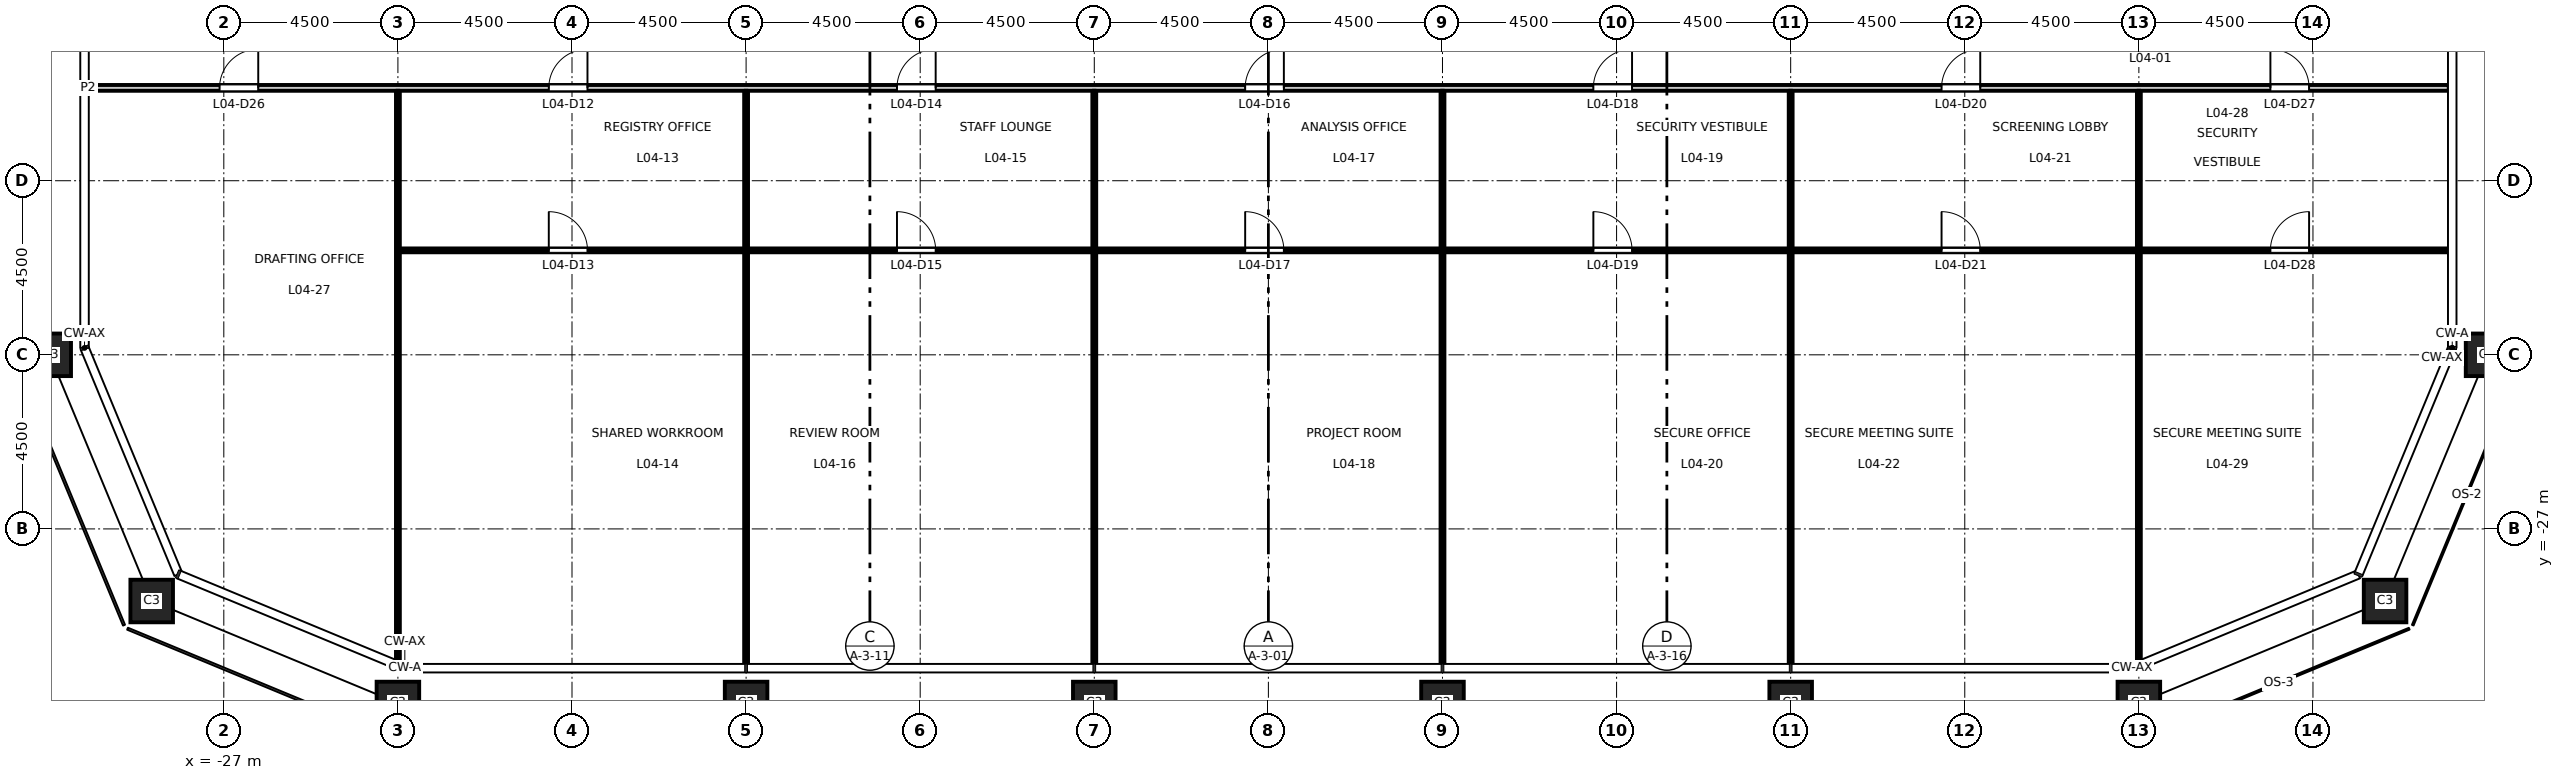
"""IFC4 building model, lengths in metres.
Left out: names, types, materials, properties, quantities, classifications, styles, units other than length and angle.
Written with IfcOpenShell. Run it as: python <this file> out.ifc"""

import sys

from ifc_helpers import new_model, si_unit, direction, frame, frame_2d, origin, origin_2d, place, context, subcontext, project, spatial, rectangle, hollow_rectangle, extrude, element, fill, save


model = new_model("IFC4")
c1 = context("Model", 3, precision=1e-05, world=origin(), true_north=direction((0.0, 1.0)))
c2 = subcontext(c1, "Body", "Model", "MODEL_VIEW")
j1 = project(units=[si_unit("LENGTHUNIT", "METRE"), si_unit("PLANEANGLEUNIT", "RADIAN")], contexts=[c1])
p1 = place(None, origin())
s1 = spatial("IfcSite", under=j1, at=p1, CompositionType="ELEMENT")
p2 = place(p1, origin())
s2 = spatial("IfcBuilding", under=s1, at=p2, CompositionType="ELEMENT")
p3 = place(p2, frame((0.0, 0.0, 22.2)))
s3 = spatial("IfcBuildingStorey", under=s2, at=p3, CompositionType="ELEMENT", Elevation=22.2)
for number, where, z_axis, x_axis in (
    (1, (-22.5, -31.5, 0.0), (0.0, 0.0, 1.0), (1.0, 0.0, 0.0)),
    (2, (-13.5, -31.5, 0.0), (0.0, 0.0, 1.0), (1.0, 0.0, 0.0)),
    (3, (-4.5, -31.5, 0.0), (0.0, 0.0, 1.0), (1.0, 0.0, 0.0)),
    (4, (4.5, -31.5, 0.0), (0.0, 0.0, 1.0), (1.0, 0.0, 0.0)),
    (5, (13.5, -31.5, 0.0), (0.0, 0.0, 1.0), (1.0, 0.0, 0.0)),
    (6, (22.5, -31.5, 0.0), (0.0, 0.0, 1.0), (1.0, 0.0, 0.0)),
    (7, (28.864, -28.864, 0.0), (0.0, 0.0, 1.0), (1.0, 0.0, 0.0)),
    (8, (31.5, -22.5, 0.0), (0.0, 0.0, 1.0), (1.0, 0.0, 0.0)),
    (9, (-31.5, -22.5, 0.0), (0.0, 0.0, 1.0), (1.0, 0.0, 0.0)),
    (10, (-28.864, -28.864, 0.0), (0.0, 0.0, 1.0), (1.0, 0.0, 0.0)),
):
    element("IfcColumn", number, at=place(p3, frame(where, z_axis=z_axis, x_axis=x_axis)), inside=s3, PredefinedType="COLUMN", context=c2, shape_type="SweptSolid", body=[
        extrude(hollow_rectangle(XDim=1.1, YDim=1.1, WallThickness=0.07, at=origin_2d()), origin(), (0.0, 0.0, 1.0), 4.5),
    ])
p4 = place(p3, frame((-22.45, -19.8, 0.0), z_axis=(0.0, 0.0, 1.0), x_axis=(1.0, 0.0, 0.0)))
e11 = element("IfcWall", 11, at=p4, inside=s3, PredefinedType="PARTITIONING", context=c2, shape_type="SweptSolid", body=[
    extrude(rectangle(XDim=52.96, YDim=0.1, at=frame_2d((26.48, 0.0))), origin(), (0.0, 0.0, 1.0), 4.35),
])
p5 = place(p4, frame((3.85, 0.0, 0.0)))
e12 = element("IfcOpeningElement", 12, at=p5, cuts=e11, PredefinedType="OPENING", context=c2, shape_type="SweptSolid", body=[
    extrude(rectangle(XDim=1.0, YDim=2.1, at=frame_2d((0.5, 1.05))), frame((0.0, 0.06, 0.0), z_axis=(0.0, -1.0, 0.0), x_axis=(1.0, 0.0, 0.0)), (0.0, 0.0, 1.0), 0.12),
])
p6 = place(p4, frame((12.85, 0.0, 0.0)))
e13 = element("IfcOpeningElement", 13, at=p6, cuts=e11, PredefinedType="OPENING", context=c2, shape_type="SweptSolid", body=[
    extrude(rectangle(XDim=1.0, YDim=2.1, at=frame_2d((0.5, 1.05))), frame((0.0, 0.06, 0.0), z_axis=(0.0, -1.0, 0.0), x_axis=(1.0, 0.0, 0.0)), (0.0, 0.0, 1.0), 0.12),
])
p7 = place(p4, frame((21.85, 0.0, 0.0)))
e14 = element("IfcOpeningElement", 14, at=p7, cuts=e11, PredefinedType="OPENING", context=c2, shape_type="SweptSolid", body=[
    extrude(rectangle(XDim=1.0, YDim=2.1, at=frame_2d((0.5, 1.05))), frame((0.0, 0.06, 0.0), z_axis=(0.0, -1.0, 0.0), x_axis=(1.0, 0.0, 0.0)), (0.0, 0.0, 1.0), 0.12),
])
p8 = place(p4, frame((30.85, 0.0, 0.0)))
e15 = element("IfcOpeningElement", 15, at=p8, cuts=e11, PredefinedType="OPENING", context=c2, shape_type="SweptSolid", body=[
    extrude(rectangle(XDim=1.0, YDim=2.1, at=frame_2d((0.5, 1.05))), frame((0.0, 0.06, 0.0), z_axis=(0.0, -1.0, 0.0), x_axis=(1.0, 0.0, 0.0)), (0.0, 0.0, 1.0), 0.12),
])
p9 = place(p4, frame((39.85, 0.0, 0.0)))
e16 = element("IfcOpeningElement", 16, at=p9, cuts=e11, PredefinedType="OPENING", context=c2, shape_type="SweptSolid", body=[
    extrude(rectangle(XDim=1.0, YDim=2.1, at=frame_2d((0.5, 1.05))), frame((0.0, 0.06, 0.0), z_axis=(0.0, -1.0, 0.0), x_axis=(1.0, 0.0, 0.0)), (0.0, 0.0, 1.0), 0.12),
])
p10 = place(p4, frame((48.35, 0.0, 0.0)))
e17 = element("IfcOpeningElement", 17, at=p10, cuts=e11, PredefinedType="OPENING", context=c2, shape_type="SweptSolid", body=[
    extrude(rectangle(XDim=1.0, YDim=2.1, at=frame_2d((0.5, 1.05))), frame((0.0, 0.06, 0.0), z_axis=(0.0, -1.0, 0.0), x_axis=(1.0, 0.0, 0.0)), (0.0, 0.0, 1.0), 0.12),
])
p11 = place(p3, frame((-30.51, -15.6, 0.0), z_axis=(0.0, 0.0, 1.0), x_axis=(1.0, 0.0, 0.0)))
e18 = element("IfcWall", 18, at=p11, inside=s3, PredefinedType="PARTITIONING", context=c2, shape_type="SweptSolid", body=[
    extrude(rectangle(XDim=61.02, YDim=0.15, at=frame_2d((30.51, 0.0))), origin(), (0.0, 0.0, 1.0), 4.35),
])
p12 = place(p11, frame((11.91, 0.0, 0.0)))
e19 = element("IfcOpeningElement", 19, at=p12, cuts=e18, PredefinedType="OPENING", context=c2, shape_type="SweptSolid", body=[
    extrude(rectangle(XDim=1.0, YDim=2.1, at=frame_2d((0.5, 1.05))), frame((0.0, 0.085, 0.0), z_axis=(0.0, -1.0, 0.0), x_axis=(1.0, 0.0, 0.0)), (0.0, 0.0, 1.0), 0.17),
])
p13 = place(p11, frame((20.91, 0.0, 0.0)))
e20 = element("IfcOpeningElement", 20, at=p13, cuts=e18, PredefinedType="OPENING", context=c2, shape_type="SweptSolid", body=[
    extrude(rectangle(XDim=1.0, YDim=2.1, at=frame_2d((0.5, 1.05))), frame((0.0, 0.085, 0.0), z_axis=(0.0, -1.0, 0.0), x_axis=(1.0, 0.0, 0.0)), (0.0, 0.0, 1.0), 0.17),
])
p14 = place(p11, frame((29.91, 0.0, 0.0)))
e21 = element("IfcOpeningElement", 21, at=p14, cuts=e18, PredefinedType="OPENING", context=c2, shape_type="SweptSolid", body=[
    extrude(rectangle(XDim=1.0, YDim=2.1, at=frame_2d((0.5, 1.05))), frame((0.0, 0.085, 0.0), z_axis=(0.0, -1.0, 0.0), x_axis=(1.0, 0.0, 0.0)), (0.0, 0.0, 1.0), 0.17),
])
p15 = place(p11, frame((38.91, 0.0, 0.0)))
e22 = element("IfcOpeningElement", 22, at=p15, cuts=e18, PredefinedType="OPENING", context=c2, shape_type="SweptSolid", body=[
    extrude(rectangle(XDim=1.0, YDim=2.1, at=frame_2d((0.5, 1.05))), frame((0.0, 0.085, 0.0), z_axis=(0.0, -1.0, 0.0), x_axis=(1.0, 0.0, 0.0)), (0.0, 0.0, 1.0), 0.17),
])
p16 = place(p11, frame((47.91, 0.0, 0.0)))
e23 = element("IfcOpeningElement", 23, at=p16, cuts=e18, PredefinedType="OPENING", context=c2, shape_type="SweptSolid", body=[
    extrude(rectangle(XDim=1.0, YDim=2.1, at=frame_2d((0.5, 1.05))), frame((0.0, 0.085, 0.0), z_axis=(0.0, -1.0, 0.0), x_axis=(1.0, 0.0, 0.0)), (0.0, 0.0, 1.0), 0.17),
])
p17 = place(p11, frame((3.4, 0.0, 0.0)))
e24 = element("IfcOpeningElement", 24, at=p17, cuts=e18, PredefinedType="OPENING", context=c2, shape_type="SweptSolid", body=[
    extrude(rectangle(XDim=1.0, YDim=2.1, at=frame_2d((0.5, 1.05))), frame((0.0, 0.085, 0.0), z_axis=(0.0, -1.0, 0.0), x_axis=(1.0, 0.0, 0.0)), (0.0, 0.0, 1.0), 0.17),
])
p18 = place(p11, frame((56.41, 0.0, 0.0)))
e25 = element("IfcOpeningElement", 25, at=p18, cuts=e18, PredefinedType="OPENING", context=c2, shape_type="SweptSolid", body=[
    extrude(rectangle(XDim=1.0, YDim=2.1, at=frame_2d((0.5, 1.05))), frame((0.0, 0.085, 0.0), z_axis=(0.0, -1.0, 0.0), x_axis=(1.0, 0.0, 0.0)), (0.0, 0.0, 1.0), 0.17),
])
p19 = place(p3, frame((-22.5, -30.428, 0.0), z_axis=(0.0, 0.0, 1.0), x_axis=(0.0, 1.0, 0.0)))
e26 = element("IfcWall", 26, at=p19, inside=s3, PredefinedType="PARTITIONING", context=c2, shape_type="SweptSolid", body=[
    extrude(rectangle(XDim=14.753, YDim=0.1, at=frame_2d((7.376, 0.0))), origin(), (0.0, 0.0, 1.0), 3.35),
])
p20 = place(p3, frame((-13.5, -30.51, 0.0), z_axis=(0.0, 0.0, 1.0), x_axis=(0.0, 1.0, 0.0)))
e27 = element("IfcWall", 27, at=p20, inside=s3, PredefinedType="PARTITIONING", context=c2, shape_type="SweptSolid", body=[
    extrude(rectangle(XDim=10.66, YDim=0.1, at=frame_2d((5.33, 0.0))), origin(), (0.0, 0.0, 1.0), 3.35),
])
p21 = place(p3, frame((-13.5, -19.75, 0.0), z_axis=(0.0, 0.0, 1.0), x_axis=(0.0, 1.0, 0.0)))
e28 = element("IfcWall", 28, at=p21, inside=s3, PredefinedType="PARTITIONING", context=c2, shape_type="SweptSolid", body=[
    extrude(rectangle(XDim=4.075, YDim=0.1, at=frame_2d((2.038, 0.0))), origin(), (0.0, 0.0, 1.0), 3.35),
])
p22 = place(p3, frame((-4.5, -30.51, 0.0), z_axis=(0.0, 0.0, 1.0), x_axis=(0.0, 1.0, 0.0)))
e29 = element("IfcWall", 29, at=p22, inside=s3, PredefinedType="PARTITIONING", context=c2, shape_type="SweptSolid", body=[
    extrude(rectangle(XDim=10.66, YDim=0.1, at=frame_2d((5.33, 0.0))), origin(), (0.0, 0.0, 1.0), 3.35),
])
p23 = place(p3, frame((-4.5, -19.75, 0.0), z_axis=(0.0, 0.0, 1.0), x_axis=(0.0, 1.0, 0.0)))
e30 = element("IfcWall", 30, at=p23, inside=s3, PredefinedType="PARTITIONING", context=c2, shape_type="SweptSolid", body=[
    extrude(rectangle(XDim=4.075, YDim=0.1, at=frame_2d((2.038, 0.0))), origin(), (0.0, 0.0, 1.0), 3.35),
])
p24 = place(p3, frame((4.5, -30.51, 0.0), z_axis=(0.0, 0.0, 1.0), x_axis=(0.0, 1.0, 0.0)))
e31 = element("IfcWall", 31, at=p24, inside=s3, PredefinedType="PARTITIONING", context=c2, shape_type="SweptSolid", body=[
    extrude(rectangle(XDim=10.66, YDim=0.1, at=frame_2d((5.33, 0.0))), origin(), (0.0, 0.0, 1.0), 3.35),
])
p25 = place(p3, frame((4.5, -19.75, 0.0), z_axis=(0.0, 0.0, 1.0), x_axis=(0.0, 1.0, 0.0)))
e32 = element("IfcWall", 32, at=p25, inside=s3, PredefinedType="PARTITIONING", context=c2, shape_type="SweptSolid", body=[
    extrude(rectangle(XDim=4.075, YDim=0.1, at=frame_2d((2.038, 0.0))), origin(), (0.0, 0.0, 1.0), 3.35),
])
p26 = place(p3, frame((13.5, -30.51, 0.0), z_axis=(0.0, 0.0, 1.0), x_axis=(0.0, 1.0, 0.0)))
e33 = element("IfcWall", 33, at=p26, inside=s3, PredefinedType="PARTITIONING", context=c2, shape_type="SweptSolid", body=[
    extrude(rectangle(XDim=10.66, YDim=0.1, at=frame_2d((5.33, 0.0))), origin(), (0.0, 0.0, 1.0), 3.35),
])
p27 = place(p3, frame((13.5, -19.75, 0.0), z_axis=(0.0, 0.0, 1.0), x_axis=(0.0, 1.0, 0.0)))
e34 = element("IfcWall", 34, at=p27, inside=s3, PredefinedType="PARTITIONING", context=c2, shape_type="SweptSolid", body=[
    extrude(rectangle(XDim=4.075, YDim=0.1, at=frame_2d((2.038, 0.0))), origin(), (0.0, 0.0, 1.0), 3.35),
])
p28 = place(p3, frame((22.5, -30.428, 0.0), z_axis=(0.0, 0.0, 1.0), x_axis=(0.0, 1.0, 0.0)))
e35 = element("IfcWall", 35, at=p28, inside=s3, PredefinedType="PARTITIONING", context=c2, shape_type="SweptSolid", body=[
    extrude(rectangle(XDim=10.578, YDim=0.1, at=frame_2d((5.289, 0.0))), origin(), (0.0, 0.0, 1.0), 3.35),
])
p29 = place(p3, frame((22.5, -19.75, 0.0), z_axis=(0.0, 0.0, 1.0), x_axis=(0.0, 1.0, 0.0)))
e36 = element("IfcWall", 36, at=p29, inside=s3, PredefinedType="PARTITIONING", context=c2, shape_type="SweptSolid", body=[
    extrude(rectangle(XDim=4.075, YDim=0.1, at=frame_2d((2.038, 0.0))), origin(), (0.0, 0.0, 1.0), 3.35),
])
p30 = place(p12, origin())
e37 = element("IfcDoor", 37, at=p30, inside=s3, OperationType="SINGLE_SWING_RIGHT", PredefinedType="DOOR", context=c2, shape_type="SweptSolid", body=[
    extrude(rectangle(XDim=1.0, YDim=2.1, at=frame_2d((0.5, 1.05))), frame((0.0, 0.025, 0.0), z_axis=(0.0, -1.0, 0.0), x_axis=(1.0, 0.0, 0.0)), (0.0, 0.0, 1.0), 0.05),
])
fill(e19, e37)
p31 = place(p5, origin())
e38 = element("IfcDoor", 38, at=p31, inside=s3, OperationType="SINGLE_SWING_LEFT", PredefinedType="DOOR", context=c2, shape_type="SweptSolid", body=[
    extrude(rectangle(XDim=1.0, YDim=2.1, at=frame_2d((0.5, 1.05))), frame((0.0, 0.025, 0.0), z_axis=(0.0, -1.0, 0.0), x_axis=(1.0, 0.0, 0.0)), (0.0, 0.0, 1.0), 0.05),
])
fill(e12, e38)
p32 = place(p13, origin())
e39 = element("IfcDoor", 39, at=p32, inside=s3, OperationType="SINGLE_SWING_RIGHT", PredefinedType="DOOR", context=c2, shape_type="SweptSolid", body=[
    extrude(rectangle(XDim=1.0, YDim=2.1, at=frame_2d((0.5, 1.05))), frame((0.0, 0.025, 0.0), z_axis=(0.0, -1.0, 0.0), x_axis=(1.0, 0.0, 0.0)), (0.0, 0.0, 1.0), 0.05),
])
fill(e20, e39)
p33 = place(p6, origin())
e40 = element("IfcDoor", 40, at=p33, inside=s3, OperationType="SINGLE_SWING_LEFT", PredefinedType="DOOR", context=c2, shape_type="SweptSolid", body=[
    extrude(rectangle(XDim=1.0, YDim=2.1, at=frame_2d((0.5, 1.05))), frame((0.0, 0.025, 0.0), z_axis=(0.0, -1.0, 0.0), x_axis=(1.0, 0.0, 0.0)), (0.0, 0.0, 1.0), 0.05),
])
fill(e13, e40)
p34 = place(p14, origin())
e41 = element("IfcDoor", 41, at=p34, inside=s3, OperationType="SINGLE_SWING_RIGHT", PredefinedType="DOOR", context=c2, shape_type="SweptSolid", body=[
    extrude(rectangle(XDim=1.0, YDim=2.1, at=frame_2d((0.5, 1.05))), frame((0.0, 0.025, 0.0), z_axis=(0.0, -1.0, 0.0), x_axis=(1.0, 0.0, 0.0)), (0.0, 0.0, 1.0), 0.05),
])
fill(e21, e41)
p35 = place(p7, origin())
e42 = element("IfcDoor", 42, at=p35, inside=s3, OperationType="SINGLE_SWING_LEFT", PredefinedType="DOOR", context=c2, shape_type="SweptSolid", body=[
    extrude(rectangle(XDim=1.0, YDim=2.1, at=frame_2d((0.5, 1.05))), frame((0.0, 0.025, 0.0), z_axis=(0.0, -1.0, 0.0), x_axis=(1.0, 0.0, 0.0)), (0.0, 0.0, 1.0), 0.05),
])
fill(e14, e42)
p36 = place(p15, origin())
e43 = element("IfcDoor", 43, at=p36, inside=s3, OperationType="SINGLE_SWING_RIGHT", PredefinedType="DOOR", context=c2, shape_type="SweptSolid", body=[
    extrude(rectangle(XDim=1.0, YDim=2.1, at=frame_2d((0.5, 1.05))), frame((0.0, 0.025, 0.0), z_axis=(0.0, -1.0, 0.0), x_axis=(1.0, 0.0, 0.0)), (0.0, 0.0, 1.0), 0.05),
])
fill(e22, e43)
p37 = place(p8, origin())
e44 = element("IfcDoor", 44, at=p37, inside=s3, OperationType="SINGLE_SWING_LEFT", PredefinedType="DOOR", context=c2, shape_type="SweptSolid", body=[
    extrude(rectangle(XDim=1.0, YDim=2.1, at=frame_2d((0.5, 1.05))), frame((0.0, 0.025, 0.0), z_axis=(0.0, -1.0, 0.0), x_axis=(1.0, 0.0, 0.0)), (0.0, 0.0, 1.0), 0.05),
])
fill(e15, e44)
p38 = place(p16, origin())
e45 = element("IfcDoor", 45, at=p38, inside=s3, OperationType="SINGLE_SWING_RIGHT", PredefinedType="DOOR", context=c2, shape_type="SweptSolid", body=[
    extrude(rectangle(XDim=1.0, YDim=2.1, at=frame_2d((0.5, 1.05))), frame((0.0, 0.025, 0.0), z_axis=(0.0, -1.0, 0.0), x_axis=(1.0, 0.0, 0.0)), (0.0, 0.0, 1.0), 0.05),
])
fill(e23, e45)
p39 = place(p9, origin())
e46 = element("IfcDoor", 46, at=p39, inside=s3, OperationType="SINGLE_SWING_LEFT", PredefinedType="DOOR", context=c2, shape_type="SweptSolid", body=[
    extrude(rectangle(XDim=1.0, YDim=2.1, at=frame_2d((0.5, 1.05))), frame((0.0, 0.025, 0.0), z_axis=(0.0, -1.0, 0.0), x_axis=(1.0, 0.0, 0.0)), (0.0, 0.0, 1.0), 0.05),
])
fill(e16, e46)
p40 = place(p17, origin())
e47 = element("IfcDoor", 47, at=p40, inside=s3, OperationType="SINGLE_SWING_RIGHT", PredefinedType="DOOR", context=c2, shape_type="SweptSolid", body=[
    extrude(rectangle(XDim=1.0, YDim=2.1, at=frame_2d((0.5, 1.05))), frame((0.0, 0.025, 0.0), z_axis=(0.0, -1.0, 0.0), x_axis=(1.0, 0.0, 0.0)), (0.0, 0.0, 1.0), 0.05),
])
fill(e24, e47)
p41 = place(p18, origin())
e48 = element("IfcDoor", 48, at=p41, inside=s3, OperationType="SINGLE_SWING_LEFT", PredefinedType="DOOR", context=c2, shape_type="SweptSolid", body=[
    extrude(rectangle(XDim=1.0, YDim=2.1, at=frame_2d((0.5, 1.05))), frame((0.0, 0.025, 0.0), z_axis=(0.0, -1.0, 0.0), x_axis=(1.0, 0.0, 0.0)), (0.0, 0.0, 1.0), 0.05),
])
fill(e25, e48)
p42 = place(p10, origin())
e49 = element("IfcDoor", 49, at=p42, inside=s3, OperationType="SINGLE_SWING_RIGHT", PredefinedType="DOOR", context=c2, shape_type="SweptSolid", body=[
    extrude(rectangle(XDim=1.0, YDim=2.1, at=frame_2d((0.5, 1.05))), frame((0.0, 0.025, 0.0), z_axis=(0.0, -1.0, 0.0), x_axis=(1.0, 0.0, 0.0)), (0.0, 0.0, 1.0), 0.05),
])
fill(e17, e49)
save(model, sys.argv[1])
